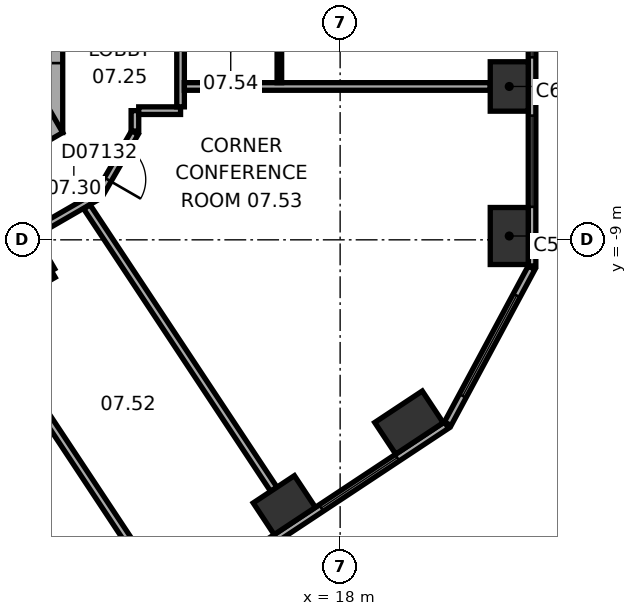
"""IFC4 building model, lengths in metres.
Left out: names, types, materials, properties, quantities, classifications, styles, units other than length and angle.
Written with IfcOpenShell. Run it as: python <this file> out.ifc"""

import sys

from ifc_helpers import new_model, si_unit, direction, frame, frame_2d, origin, origin_2d, place, context, subcontext, project, spatial, rectangle, extrude, element, fill, save


model = new_model("IFC4")
c1 = context("Model", 3, precision=1e-05, world=origin(), true_north=direction((0.0, 1.0)))
c2 = subcontext(c1, "Body", "Model", "MODEL_VIEW")
j1 = project(units=[si_unit("LENGTHUNIT", "METRE"), si_unit("PLANEANGLEUNIT", "RADIAN")], contexts=[c1])
p1 = place(None, origin())
s1 = spatial("IfcSite", under=j1, at=p1, CompositionType="ELEMENT")
p2 = place(p1, origin())
s2 = spatial("IfcBuilding", under=s1, at=p2, CompositionType="ELEMENT")
p3 = place(p2, frame((0.0, 0.0, 44.0)))
s3 = spatial("IfcBuildingStorey", under=s2, at=p3, CompositionType="ELEMENT", Elevation=44.0)
p4 = place(p3, frame((22.45, -8.899, 0.0), z_axis=(0.0, 0.0, 1.0), x_axis=(0.0, 1.0, 0.0)))
e1 = element("IfcColumn", 1, at=p4, inside=s3, PredefinedType="COLUMN", context=c2, shape_type="SweptSolid", body=[
    extrude(rectangle(XDim=1.5, YDim=1.0, at=origin_2d()), origin(), (0.0, 0.0, 1.0), 3.3),
])
for number, where, z_axis, x_axis in (
    (2, (22.45, -4.965, 0.0), (0.0, 0.0, 1.0), (0.0, 1.0, 0.0)),
    (3, (16.531, -15.981, 0.0), (0.0, 0.0, 1.0), (0.834, 0.552, 0.0)),
):
    element("IfcColumn", number, at=place(p3, frame(where, z_axis=z_axis, x_axis=x_axis)), inside=s3, PredefinedType="COLUMN", context=c2, shape_type="SweptSolid", body=[
        extrude(rectangle(XDim=1.3, YDim=1.0, at=origin_2d()), origin(), (0.0, 0.0, 1.0), 3.3),
    ])
p5 = place(p3, frame((19.812, -13.809, 0.0), z_axis=(0.0, 0.0, 1.0), x_axis=(0.833885822067, 0.551936985312, 0.0)))
e4 = element("IfcColumn", 4, at=p5, inside=s3, PredefinedType="COLUMN", context=c2, shape_type="SweptSolid", body=[
    extrude(rectangle(XDim=1.5, YDim=1.0, at=origin_2d()), origin(), (0.0, 0.0, 1.0), 3.3),
])
p6 = place(p3, frame((10.1, -6.177, 0.0), z_axis=(0.0, 0.0, 1.0), x_axis=(0.0, 1.0, 0.0)))
e5 = element("IfcWall", 5, at=p6, inside=s3, PredefinedType="SHEAR", context=c2, shape_type="SweptSolid", body=[
    extrude(rectangle(XDim=12.355, YDim=1.2, at=frame_2d((6.177, 0.0))), origin(), (0.0, 0.0, 1.0), 3.3),
])
p7 = place(p6, frame((6.378, 0.0, 0.0)))
e6 = element("IfcOpeningElement", 6, at=p7, cuts=e5, PredefinedType="OPENING", context=c2, shape_type="SweptSolid", body=[
    extrude(rectangle(XDim=1.5, YDim=2.1, at=frame_2d((0.75, 1.05))), frame((0.0, 0.61, 0.0), z_axis=(0.0, -1.0, 0.0), x_axis=(1.0, 0.0, 0.0)), (0.0, 0.0, 1.0), 1.22),
])
p8 = place(p6, frame((1.828, 0.0, 0.0)))
e7 = element("IfcOpeningElement", 7, at=p8, cuts=e5, PredefinedType="OPENING", context=c2, shape_type="SweptSolid", body=[
    extrude(rectangle(XDim=1.1, YDim=2.1, at=frame_2d((0.55, 1.05))), frame((0.0, 0.61, 0.0), z_axis=(0.0, -1.0, 0.0), x_axis=(1.0, 0.0, 0.0)), (0.0, 0.0, 1.0), 1.22),
])
p9 = place(p6, frame((4.427, 0.0, 0.0)))
e8 = element("IfcOpeningElement", 8, at=p9, cuts=e5, PredefinedType="OPENING", context=c2, shape_type="SweptSolid", body=[
    extrude(rectangle(XDim=1.1, YDim=2.1, at=frame_2d((0.55, 1.05))), frame((0.0, 0.61, 0.0), z_axis=(0.0, -1.0, 0.0), x_axis=(1.0, 0.0, 0.0)), (0.0, 0.0, 1.0), 1.22),
])
p10 = place(p3, frame((-0.3, -11.836, 0.0), z_axis=(0.0, 0.0, 1.0), x_axis=(0.866021384402, 0.500006961711, 0.0)))
e9 = element("IfcWall", 9, at=p10, inside=s3, PredefinedType="SHEAR", context=c2, shape_type="SweptSolid", body=[
    extrude(rectangle(XDim=12.355, YDim=1.2, at=frame_2d((6.178, 0.0))), origin(), (0.0, 0.0, 1.0), 3.3),
])
p11 = place(p10, frame((2.828, 0.0, 0.0)))
e10 = element("IfcOpeningElement", 10, at=p11, cuts=e9, PredefinedType="OPENING", context=c2, shape_type="SweptSolid", body=[
    extrude(rectangle(XDim=0.9, YDim=2.1, at=frame_2d((0.45, 1.05))), frame((0.0, 0.61, 0.0), z_axis=(0.0, -1.0, 0.0), x_axis=(1.0, 0.0, 0.0)), (0.0, 0.0, 1.0), 1.22),
])
p12 = place(p10, frame((5.428, 0.0, 0.0)))
e11 = element("IfcOpeningElement", 11, at=p12, cuts=e9, PredefinedType="OPENING", context=c2, shape_type="SweptSolid", body=[
    extrude(rectangle(XDim=0.9, YDim=2.1, at=frame_2d((0.45, 1.05))), frame((0.0, 0.61, 0.0), z_axis=(0.0, -1.0, 0.0), x_axis=(1.0, 0.0, 0.0)), (0.0, 0.0, 1.0), 1.22),
])
p13 = place(p10, frame((7.928, 0.0, 0.0)))
e12 = element("IfcOpeningElement", 12, at=p13, cuts=e9, PredefinedType="OPENING", context=c2, shape_type="SweptSolid", body=[
    extrude(rectangle(XDim=1.1, YDim=2.1, at=frame_2d((0.55, 1.05))), frame((0.0, 0.61, 0.0), z_axis=(0.0, -1.0, 0.0), x_axis=(1.0, 0.0, 0.0)), (0.0, 0.0, 1.0), 1.22),
])
p14 = place(p3, frame((23.05, -9.687, 0.0), z_axis=(0.0, 0.0, 1.0), x_axis=(0.0, 1.0, 0.0)))
e13 = element("IfcWall", 13, at=p14, inside=s3, PredefinedType="STANDARD", context=c2, shape_type="SweptSolid", body=[
    extrude(rectangle(XDim=21.246, YDim=0.2, at=frame_2d((10.623, 0.0))), origin(), (0.0, 0.0, 1.0), 3.3),
])
p15 = place(p14, frame((1.555, 0.0, 0.8)))
e14 = element("IfcOpeningElement", 14, at=p15, cuts=e13, PredefinedType="OPENING", context=c2, shape_type="SweptSolid", body=[
    extrude(rectangle(XDim=2.4, YDim=1.7, at=frame_2d((1.2, 0.85))), frame((0.0, 0.11, 0.0), z_axis=(0.0, -1.0, 0.0), x_axis=(1.0, 0.0, 0.0)), (0.0, 0.0, 1.0), 0.22),
])
p16 = place(p14, frame((5.489, 0.0, 0.8)))
e15 = element("IfcOpeningElement", 15, at=p16, cuts=e13, PredefinedType="OPENING", context=c2, shape_type="SweptSolid", body=[
    extrude(rectangle(XDim=2.4, YDim=1.7, at=frame_2d((1.2, 0.85))), frame((0.0, 0.11, 0.0), z_axis=(0.0, -1.0, 0.0), x_axis=(1.0, 0.0, 0.0)), (0.0, 0.0, 1.0), 0.22),
])
p17 = place(p14, frame((9.424, 0.0, 0.8)))
e16 = element("IfcOpeningElement", 16, at=p17, cuts=e13, PredefinedType="OPENING", context=c2, shape_type="SweptSolid", body=[
    extrude(rectangle(XDim=2.4, YDim=1.7, at=frame_2d((1.2, 0.85))), frame((0.0, 0.11, 0.0), z_axis=(0.0, -1.0, 0.0), x_axis=(1.0, 0.0, 0.0)), (0.0, 0.0, 1.0), 0.22),
])
p18 = place(p14, frame((13.358, 0.0, 0.8)))
e17 = element("IfcOpeningElement", 17, at=p18, cuts=e13, PredefinedType="OPENING", context=c2, shape_type="SweptSolid", body=[
    extrude(rectangle(XDim=2.4, YDim=1.7, at=frame_2d((1.2, 0.85))), frame((0.0, 0.11, 0.0), z_axis=(0.0, -1.0, 0.0), x_axis=(1.0, 0.0, 0.0)), (0.0, 0.0, 1.0), 0.22),
])
p19 = place(p14, frame((17.293, 0.0, 0.8)))
e18 = element("IfcOpeningElement", 18, at=p19, cuts=e13, PredefinedType="OPENING", context=c2, shape_type="SweptSolid", body=[
    extrude(rectangle(XDim=2.4, YDim=1.7, at=frame_2d((1.2, 0.85))), frame((0.0, 0.11, 0.0), z_axis=(0.0, -1.0, 0.0), x_axis=(1.0, 0.0, 0.0)), (0.0, 0.0, 1.0), 0.22),
])
p20 = place(p3, frame((3.083, -25.601, 0.0), z_axis=(0.0, 0.0, 1.0), x_axis=(0.833884295743, 0.551939291329, 0.0)))
e19 = element("IfcWall", 19, at=p20, inside=s3, PredefinedType="STANDARD", context=c2, shape_type="SweptSolid", body=[
    extrude(rectangle(XDim=21.246, YDim=0.2, at=frame_2d((10.623, 0.0))), origin(), (0.0, 0.0, 1.0), 3.3),
])
p21 = place(p20, frame((1.553, 0.0, 0.8)))
e20 = element("IfcOpeningElement", 20, at=p21, cuts=e19, PredefinedType="OPENING", context=c2, shape_type="SweptSolid", body=[
    extrude(rectangle(XDim=2.4, YDim=1.7, at=frame_2d((1.2, 0.85))), frame((0.0, 0.11, 0.0), z_axis=(0.0, -1.0, 0.0), x_axis=(1.0, 0.0, 0.0)), (0.0, 0.0, 1.0), 0.22),
])
p22 = place(p20, frame((5.488, 0.0, 0.8)))
e21 = element("IfcOpeningElement", 21, at=p22, cuts=e19, PredefinedType="OPENING", context=c2, shape_type="SweptSolid", body=[
    extrude(rectangle(XDim=2.4, YDim=1.7, at=frame_2d((1.2, 0.85))), frame((0.0, 0.11, 0.0), z_axis=(0.0, -1.0, 0.0), x_axis=(1.0, 0.0, 0.0)), (0.0, 0.0, 1.0), 0.22),
])
p23 = place(p20, frame((9.422, 0.0, 0.8)))
e22 = element("IfcOpeningElement", 22, at=p23, cuts=e19, PredefinedType="OPENING", context=c2, shape_type="SweptSolid", body=[
    extrude(rectangle(XDim=2.4, YDim=1.7, at=frame_2d((1.2, 0.85))), frame((0.0, 0.11, 0.0), z_axis=(0.0, -1.0, 0.0), x_axis=(1.0, 0.0, 0.0)), (0.0, 0.0, 1.0), 0.22),
])
p24 = place(p20, frame((13.357, 0.0, 0.8)))
e23 = element("IfcOpeningElement", 23, at=p24, cuts=e19, PredefinedType="OPENING", context=c2, shape_type="SweptSolid", body=[
    extrude(rectangle(XDim=2.4, YDim=1.7, at=frame_2d((1.2, 0.85))), frame((0.0, 0.11, 0.0), z_axis=(0.0, -1.0, 0.0), x_axis=(1.0, 0.0, 0.0)), (0.0, 0.0, 1.0), 0.22),
])
p25 = place(p20, frame((17.291, 0.0, 0.8)))
e24 = element("IfcOpeningElement", 24, at=p25, cuts=e19, PredefinedType="OPENING", context=c2, shape_type="SweptSolid", body=[
    extrude(rectangle(XDim=2.4, YDim=1.7, at=frame_2d((1.2, 0.85))), frame((0.0, 0.11, 0.0), z_axis=(0.0, -1.0, 0.0), x_axis=(1.0, 0.0, 0.0)), (0.0, 0.0, 1.0), 0.22),
])
p26 = place(p3, frame((20.833, -13.839, 0.0), z_axis=(0.0, 0.0, 1.0), x_axis=(0.473321668581, 0.880889662813, 0.0)))
e25 = element("IfcWall", 25, at=p26, inside=s3, PredefinedType="STANDARD", context=c2, shape_type="SweptSolid", body=[
    extrude(rectangle(XDim=4.66, YDim=0.2, at=frame_2d((2.33, 0.0))), origin(), (0.0, 0.0, 1.0), 3.3),
])
p27 = place(p26, frame((0.83, 0.0, 0.8)))
e26 = element("IfcOpeningElement", 26, at=p27, cuts=e25, PredefinedType="OPENING", context=c2, shape_type="SweptSolid", body=[
    extrude(rectangle(XDim=3.0, YDim=1.7, at=frame_2d((1.5, 0.85))), frame((0.0, 0.11, 0.0), z_axis=(0.0, -1.0, 0.0), x_axis=(1.0, 0.0, 0.0)), (0.0, 0.0, 1.0), 0.22),
])
p28 = place(p3, frame((7.419, -11.653, 0.0), z_axis=(0.0, 0.0, 1.0), x_axis=(0.866038154057, 0.49997791523, 0.0)))
e27 = element("IfcWall", 27, at=p28, inside=s3, PredefinedType="PARTITIONING", context=c2, shape_type="SweptSolid", body=[
    extrude(rectangle(XDim=3.502, YDim=0.2, at=frame_2d((1.751, 0.0))), origin(), (0.0, 0.0, 1.0), 3.05),
])
p29 = place(p28, frame((1.94, 0.0, 0.0)))
e28 = element("IfcOpeningElement", 28, at=p29, cuts=e27, PredefinedType="OPENING", context=c2, shape_type="SweptSolid", body=[
    extrude(rectangle(XDim=0.9, YDim=2.1, at=frame_2d((0.45, 1.05))), frame((0.0, 0.11, 0.0), z_axis=(0.0, -1.0, 0.0), x_axis=(1.0, 0.0, 0.0)), (0.0, 0.0, 1.0), 0.22),
])
p30 = place(p3, frame((9.852, -8.861, 0.0), z_axis=(0.0, 0.0, 1.0), x_axis=(0.866013291437, 0.500020978615, 0.0)))
e29 = element("IfcWall", 29, at=p30, inside=s3, PredefinedType="PARTITIONING", context=c2, shape_type="SweptSolid", body=[
    extrude(rectangle(XDim=2.077, YDim=0.2, at=frame_2d((1.038, 0.0))), origin(), (0.0, 0.0, 1.0), 3.05),
])
p31 = place(p3, frame((10.402, -9.815, 0.0), z_axis=(0.0, 0.0, 1.0), x_axis=(-0.499968756647, 0.866043441391, 0.0)))
e30 = element("IfcWall", 30, at=p31, inside=s3, PredefinedType="PARTITIONING", context=c2, shape_type="SweptSolid", body=[
    extrude(rectangle(XDim=1.001, YDim=0.2, at=frame_2d((0.5, 0.0))), origin(), (0.0, 0.0, 1.0), 3.05),
])
p32 = place(p3, frame((11.67, -7.788, 0.0), z_axis=(0.0, 0.0, 1.0), x_axis=(0.500063286585, 0.865988862174, 0.0)))
e31 = element("IfcWall", 31, at=p32, inside=s3, PredefinedType="PARTITIONING", context=c2, shape_type="SweptSolid", body=[
    extrude(rectangle(XDim=1.86, YDim=0.2, at=frame_2d((0.93, 0.0))), origin(), (0.0, 0.0, 1.0), 3.05),
])
p33 = place(p32, frame((0.43, 0.0, 0.0)))
e32 = element("IfcOpeningElement", 32, at=p33, cuts=e31, PredefinedType="OPENING", context=c2, shape_type="SweptSolid", body=[
    extrude(rectangle(XDim=1.0, YDim=2.1, at=frame_2d((0.5, 1.05))), frame((0.0, 0.11, 0.0), z_axis=(0.0, -1.0, 0.0), x_axis=(1.0, 0.0, 0.0)), (0.0, 0.0, 1.0), 0.22),
])
p34 = place(p3, frame((12.6, -6.138, 0.0), z_axis=(0.0, 0.0, 1.0), x_axis=(0.0, 1.0, 0.0)))
e33 = element("IfcWall", 33, at=p34, inside=s3, PredefinedType="PARTITIONING", context=c2, shape_type="SweptSolid", body=[
    extrude(rectangle(XDim=0.537, YDim=0.2, at=frame_2d((0.268, 0.0))), origin(), (0.0, 0.0, 1.0), 3.05),
])
p35 = place(p3, frame((12.7, -5.601, 0.0), z_axis=(0.0, 0.0, 1.0), x_axis=(1.0, 0.0, 0.0)))
e34 = element("IfcWall", 34, at=p35, inside=s3, PredefinedType="PARTITIONING", context=c2, shape_type="SweptSolid", body=[
    extrude(rectangle(XDim=1.101, YDim=0.2, at=frame_2d((0.551, 0.0))), origin(), (0.0, 0.0, 1.0), 3.05),
])
p36 = place(p3, frame((12.974, -17.735, 0.0), z_axis=(0.0, 0.0, 1.0), x_axis=(-0.55192625685, 0.833892922982, 0.0)))
e35 = element("IfcWall", 35, at=p36, inside=s3, PredefinedType="PARTITIONING", context=c2, shape_type="SweptSolid", body=[
    extrude(rectangle(XDim=7.95, YDim=0.2, at=frame_2d((3.975, 0.0))), origin(), (0.0, 0.0, 1.0), 3.05),
])
p37 = place(p3, frame((13.801, -5.501, 0.0), z_axis=(0.0, 0.0, 1.0), x_axis=(0.0, 1.0, 0.0)))
e36 = element("IfcWall", 36, at=p37, inside=s3, PredefinedType="PARTITIONING", context=c2, shape_type="SweptSolid", body=[
    extrude(rectangle(XDim=5.702, YDim=0.2, at=frame_2d((2.851, 0.0))), origin(), (0.0, 0.0, 1.0), 3.05),
])
p38 = place(p37, frame((3.079, 0.0, 0.0)))
e37 = element("IfcOpeningElement", 37, at=p38, cuts=e36, PredefinedType="OPENING", context=c2, shape_type="SweptSolid", body=[
    extrude(rectangle(XDim=0.9, YDim=2.1, at=frame_2d((0.45, 1.05))), frame((0.0, 0.11, 0.0), z_axis=(0.0, -1.0, 0.0), x_axis=(1.0, 0.0, 0.0)), (0.0, 0.0, 1.0), 0.22),
])
p39 = place(p37, frame((4.636, 0.0, 0.0)))
e38 = element("IfcOpeningElement", 38, at=p39, cuts=e36, PredefinedType="OPENING", context=c2, shape_type="SweptSolid", body=[
    extrude(rectangle(XDim=0.9, YDim=2.1, at=frame_2d((0.45, 1.05))), frame((0.0, 0.11, 0.0), z_axis=(0.0, -1.0, 0.0), x_axis=(1.0, 0.0, 0.0)), (0.0, 0.0, 1.0), 0.22),
])
p40 = place(p3, frame((13.901, -4.965, 0.0), z_axis=(0.0, 0.0, 1.0), x_axis=(1.0, 0.0, 0.0)))
e39 = element("IfcWall", 39, at=p40, inside=s3, PredefinedType="PARTITIONING", context=c2, shape_type="SweptSolid", body=[
    extrude(rectangle(XDim=8.049, YDim=0.2, at=frame_2d((4.024, 0.0))), origin(), (0.0, 0.0, 1.0), 3.05),
])
p41 = place(p3, frame((16.255, -15.564, 0.0), z_axis=(0.0, 0.0, 1.0), x_axis=(-0.55192208744, 0.833895682562, 0.0)))
e40 = element("IfcWall", 40, at=p41, inside=s3, PredefinedType="PARTITIONING", context=c2, shape_type="SweptSolid", body=[
    extrude(rectangle(XDim=8.913, YDim=0.2, at=frame_2d((4.457, 0.0))), origin(), (0.0, 0.0, 1.0), 2.6),
])
p42 = place(p3, frame((16.401, -3.025, 0.0), z_axis=(0.0, 0.0, 1.0), x_axis=(0.0, -1.0, 0.0)))
e41 = element("IfcWall", 41, at=p42, inside=s3, PredefinedType="PARTITIONING", context=c2, shape_type="SweptSolid", body=[
    extrude(rectangle(XDim=1.84, YDim=0.12, at=frame_2d((0.92, 0.0))), origin(), (0.0, 0.0, 1.0), 3.05),
])
p43 = place(p15, origin())
e42 = element("IfcWindow", 42, at=p43, inside=s3, PartitioningType="SINGLE_PANEL", PredefinedType="WINDOW", context=c2, shape_type="SweptSolid", body=[
    extrude(rectangle(XDim=2.4, YDim=1.7, at=frame_2d((1.2, 0.85))), frame((0.0, 0.03, 0.0), z_axis=(0.0, -1.0, 0.0), x_axis=(1.0, 0.0, 0.0)), (0.0, 0.0, 1.0), 0.06),
])
fill(e14, e42)
p44 = place(p16, origin())
e43 = element("IfcWindow", 43, at=p44, inside=s3, PartitioningType="SINGLE_PANEL", PredefinedType="WINDOW", context=c2, shape_type="SweptSolid", body=[
    extrude(rectangle(XDim=2.4, YDim=1.7, at=frame_2d((1.2, 0.85))), frame((0.0, 0.03, 0.0), z_axis=(0.0, -1.0, 0.0), x_axis=(1.0, 0.0, 0.0)), (0.0, 0.0, 1.0), 0.06),
])
fill(e15, e43)
p45 = place(p25, origin())
e44 = element("IfcWindow", 44, at=p45, inside=s3, PartitioningType="SINGLE_PANEL", PredefinedType="WINDOW", context=c2, shape_type="SweptSolid", body=[
    extrude(rectangle(XDim=2.4, YDim=1.7, at=frame_2d((1.2, 0.85))), frame((0.0, 0.03, 0.0), z_axis=(0.0, -1.0, 0.0), x_axis=(1.0, 0.0, 0.0)), (0.0, 0.0, 1.0), 0.06),
])
fill(e24, e44)
p46 = place(p27, origin())
e45 = element("IfcWindow", 45, at=p46, inside=s3, PartitioningType="SINGLE_PANEL", PredefinedType="WINDOW", context=c2, shape_type="SweptSolid", body=[
    extrude(rectangle(XDim=3.0, YDim=1.7, at=frame_2d((1.5, 0.85))), frame((0.0, 0.03, 0.0), z_axis=(0.0, -1.0, 0.0), x_axis=(1.0, 0.0, 0.0)), (0.0, 0.0, 1.0), 0.06),
])
fill(e26, e45)
p47 = place(p33, origin())
e46 = element("IfcDoor", 46, at=p47, inside=s3, OperationType="SINGLE_SWING_LEFT", PredefinedType="DOOR", context=c2, shape_type="SweptSolid", body=[
    extrude(rectangle(XDim=1.0, YDim=2.1, at=frame_2d((0.5, 1.05))), frame((0.0, 0.025, 0.0), z_axis=(0.0, -1.0, 0.0), x_axis=(1.0, 0.0, 0.0)), (0.0, 0.0, 1.0), 0.05),
])
fill(e32, e46)
save(model, sys.argv[1])
